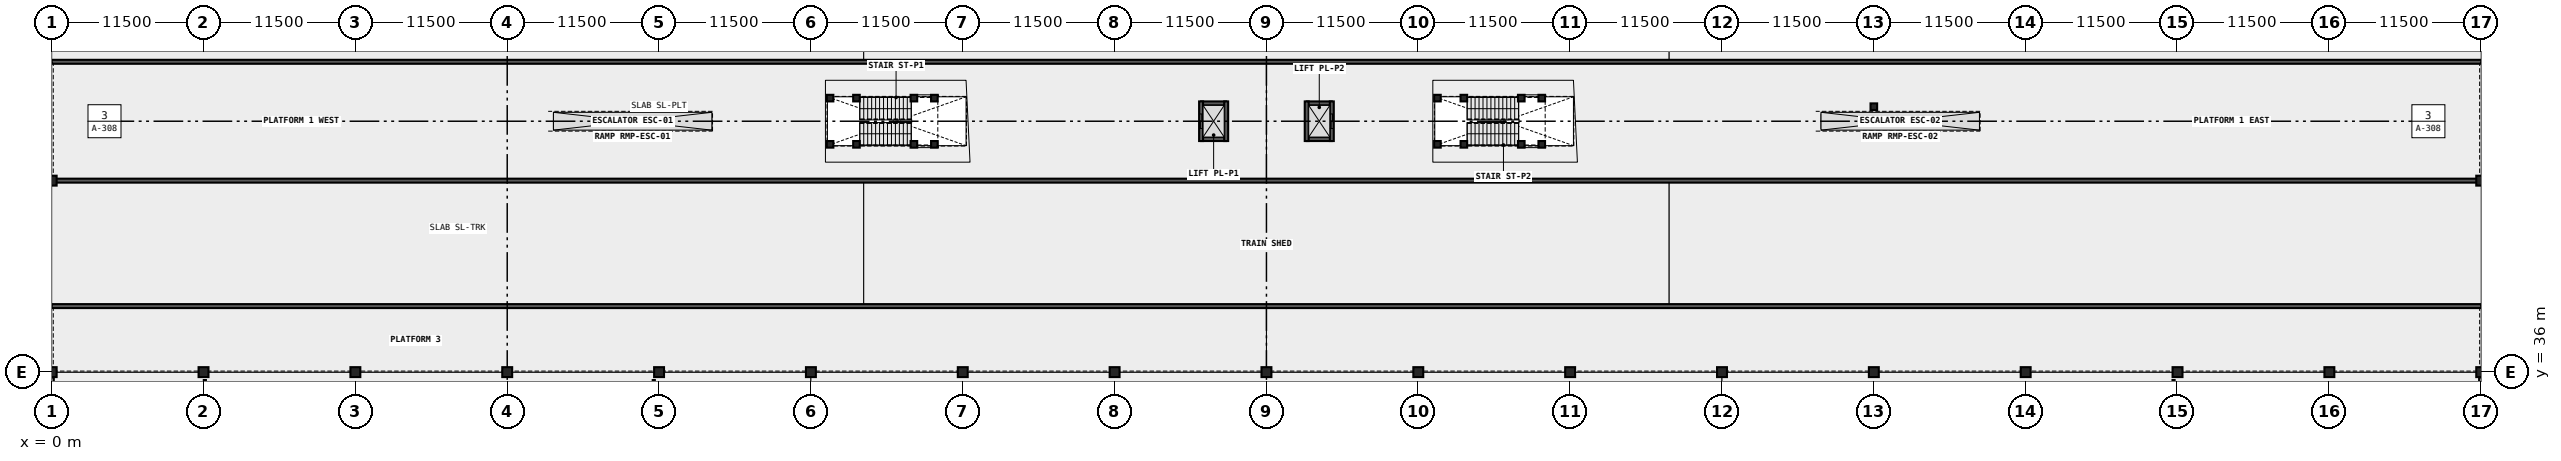
"""IFC4 building model, lengths in metres.
Left out: names, types, materials, properties, quantities, classifications, styles, units other than length and angle.
Written with IfcOpenShell. Run it as: python <this file> out.ifc"""

import sys

from ifc_helpers import new_model, si_unit, direction, frame, frame_2d, origin, origin_2d, place, context, subcontext, project, spatial, rectangle, extrude, element, fill, save


model = new_model("IFC4")
c1 = context("Model", 3, precision=1e-05, world=origin(), true_north=direction((0.0, 1.0)))
c2 = subcontext(c1, "Body", "Model", "MODEL_VIEW")
j1 = project(units=[si_unit("LENGTHUNIT", "METRE"), si_unit("PLANEANGLEUNIT", "RADIAN")], contexts=[c1])
p1 = place(None, origin())
s1 = spatial("IfcSite", under=j1, at=p1, CompositionType="ELEMENT")
p2 = place(p1, origin())
s2 = spatial("IfcBuilding", under=s1, at=p2, CompositionType="ELEMENT")
p3 = place(p2, origin())
s3 = spatial("IfcBuildingStorey", under=s2, at=p3, CompositionType="ELEMENT", Elevation=0.0)
for number, where, z_axis, x_axis in (
    (1, (0.0, 36.0, 0.0), (0.0, 0.0, 1.0), (1.0, 0.0, 0.0)),
    (2, (11.5, 36.0, 0.0), (0.0, 0.0, 1.0), (1.0, 0.0, 0.0)),
    (3, (23.0, 36.0, 0.0), (0.0, 0.0, 1.0), (1.0, 0.0, 0.0)),
    (4, (34.5, 36.0, 0.0), (0.0, 0.0, 1.0), (1.0, 0.0, 0.0)),
    (5, (46.0, 36.0, 0.0), (0.0, 0.0, 1.0), (1.0, 0.0, 0.0)),
    (6, (57.5, 36.0, 0.0), (0.0, 0.0, 1.0), (1.0, 0.0, 0.0)),
    (7, (69.0, 36.0, 0.0), (0.0, 0.0, 1.0), (1.0, 0.0, 0.0)),
    (8, (80.5, 36.0, 0.0), (0.0, 0.0, 1.0), (1.0, 0.0, 0.0)),
    (9, (92.0, 36.0, 0.0), (0.0, 0.0, 1.0), (1.0, 0.0, 0.0)),
    (10, (103.5, 36.0, 0.0), (0.0, 0.0, 1.0), (1.0, 0.0, 0.0)),
    (11, (115.0, 36.0, 0.0), (0.0, 0.0, 1.0), (1.0, 0.0, 0.0)),
    (12, (126.5, 36.0, 0.0), (0.0, 0.0, 1.0), (1.0, 0.0, 0.0)),
    (13, (138.0, 36.0, 0.0), (0.0, 0.0, 1.0), (1.0, 0.0, 0.0)),
    (14, (149.5, 36.0, 0.0), (0.0, 0.0, 1.0), (1.0, 0.0, 0.0)),
    (15, (161.0, 36.0, 0.0), (0.0, 0.0, 1.0), (1.0, 0.0, 0.0)),
    (16, (172.5, 36.0, 0.0), (0.0, 0.0, 1.0), (1.0, 0.0, 0.0)),
    (17, (184.0, 36.0, 0.0), (0.0, 0.0, 1.0), (1.0, 0.0, 0.0)),
):
    element("IfcColumn", number, at=place(p3, frame(where, z_axis=z_axis, x_axis=x_axis)), inside=s3, PredefinedType="COLUMN", context=c2, shape_type="SweptSolid", body=[
        extrude(rectangle(XDim=0.75, YDim=0.75, at=origin_2d()), origin(), (0.0, 0.0, 1.0), 4.2),
    ])
for number, where, z_axis, x_axis in (
    (18, (87.05, 53.65, 0.95), (0.0, 0.0, 1.0), (1.0, 0.0, 0.0)),
    (19, (87.05, 56.35, 0.95), (0.0, 0.0, 1.0), (1.0, 0.0, 0.0)),
):
    element("IfcWall", number, at=place(p3, frame(where, z_axis=z_axis, x_axis=x_axis)), inside=s3, PredefinedType="SHEAR", context=c2, shape_type="SweptSolid", body=[
        extrude(rectangle(XDim=1.9, YDim=0.3, at=frame_2d((0.95, 0.0))), origin(), (0.0, 0.0, 1.0), 3.25),
    ])
p4 = place(p3, frame((87.05, 53.5, 0.95), z_axis=(0.0, 0.0, 1.0), x_axis=(0.0, 1.0, 0.0)))
e20 = element("IfcWall", 20, at=p4, inside=s3, PredefinedType="SHEAR", context=c2, shape_type="SweptSolid", body=[
    extrude(rectangle(XDim=3.0, YDim=0.3, at=frame_2d((1.5, 0.0))), origin(), (0.0, 0.0, 1.0), 3.25),
])
p5 = place(p4, frame((0.95, 0.0, 0.3)))
e21 = element("IfcOpeningElement", 21, at=p5, cuts=e20, PredefinedType="OPENING", context=c2, shape_type="SweptSolid", body=[
    extrude(rectangle(XDim=1.1, YDim=2.15, at=frame_2d((0.55, 1.075))), frame((0.0, 0.16, 0.0), z_axis=(0.0, -1.0, 0.0), x_axis=(1.0, 0.0, 0.0)), (0.0, 0.0, 1.0), 0.32),
])
p6 = place(p3, frame((88.95, 53.5, 0.95), z_axis=(0.0, 0.0, 1.0), x_axis=(0.0, 1.0, 0.0)))
e22 = element("IfcWall", 22, at=p6, inside=s3, PredefinedType="SHEAR", context=c2, shape_type="SweptSolid", body=[
    extrude(rectangle(XDim=3.0, YDim=0.3, at=frame_2d((1.5, 0.0))), origin(), (0.0, 0.0, 1.0), 3.25),
])
for number, where, z_axis, x_axis in (
    (23, (95.05, 53.65, 0.95), (0.0, 0.0, 1.0), (1.0, 0.0, 0.0)),
    (24, (95.05, 56.35, 0.95), (0.0, 0.0, 1.0), (1.0, 0.0, 0.0)),
):
    element("IfcWall", number, at=place(p3, frame(where, z_axis=z_axis, x_axis=x_axis)), inside=s3, PredefinedType="SHEAR", context=c2, shape_type="SweptSolid", body=[
        extrude(rectangle(XDim=1.9, YDim=0.3, at=frame_2d((0.95, 0.0))), origin(), (0.0, 0.0, 1.0), 3.25),
    ])
p7 = place(p3, frame((95.05, 53.5, 0.95), z_axis=(0.0, 0.0, 1.0), x_axis=(0.0, 1.0, 0.0)))
e25 = element("IfcWall", 25, at=p7, inside=s3, PredefinedType="SHEAR", context=c2, shape_type="SweptSolid", body=[
    extrude(rectangle(XDim=3.0, YDim=0.3, at=frame_2d((1.5, 0.0))), origin(), (0.0, 0.0, 1.0), 3.25),
])
p8 = place(p3, frame((96.95, 53.5, 0.95), z_axis=(0.0, 0.0, 1.0), x_axis=(0.0, 1.0, 0.0)))
e26 = element("IfcWall", 26, at=p8, inside=s3, PredefinedType="SHEAR", context=c2, shape_type="SweptSolid", body=[
    extrude(rectangle(XDim=3.0, YDim=0.3, at=frame_2d((1.5, 0.0))), origin(), (0.0, 0.0, 1.0), 3.25),
])
p9 = place(p8, frame((0.95, 0.0, 0.3)))
e27 = element("IfcOpeningElement", 27, at=p9, cuts=e26, PredefinedType="OPENING", context=c2, shape_type="SweptSolid", body=[
    extrude(rectangle(XDim=1.1, YDim=2.15, at=frame_2d((0.55, 1.075))), frame((0.0, 0.16, 0.0), z_axis=(0.0, -1.0, 0.0), x_axis=(1.0, 0.0, 0.0)), (0.0, 0.0, 1.0), 0.32),
])
for number, where, z_axis, x_axis in (
    (28, (58.95, 53.25, -0.32), (0.0, 0.0, 1.0), (1.0, 0.0, 0.0)),
    (29, (58.95, 56.75, -0.32), (0.0, 0.0, 1.0), (1.0, 0.0, 0.0)),
    (30, (60.95, 53.25, -0.32), (0.0, 0.0, 1.0), (1.0, 0.0, 0.0)),
    (31, (60.95, 56.75, -0.32), (0.0, 0.0, 1.0), (1.0, 0.0, 0.0)),
):
    element("IfcColumn", number, at=place(p3, frame(where, z_axis=z_axis, x_axis=x_axis)), inside=s3, PredefinedType="COLUMN", context=c2, shape_type="SweptSolid", body=[
        extrude(rectangle(XDim=0.5, YDim=0.5, at=origin_2d()), origin(), (0.0, 0.0, 1.0), 4.22),
    ])
for number, where, z_axis, x_axis in (
    (32, (65.3, 53.25, -0.32), (0.0, 0.0, 1.0), (1.0, 0.0, 0.0)),
    (33, (65.3, 56.75, -0.32), (0.0, 0.0, 1.0), (1.0, 0.0, 0.0)),
    (34, (66.85, 53.25, -0.32), (0.0, 0.0, 1.0), (1.0, 0.0, 0.0)),
    (35, (66.85, 56.75, -0.32), (0.0, 0.0, 1.0), (1.0, 0.0, 0.0)),
):
    element("IfcColumn", number, at=place(p3, frame(where, z_axis=z_axis, x_axis=x_axis)), inside=s3, PredefinedType="COLUMN", context=c2, shape_type="SweptSolid", body=[
        extrude(rectangle(XDim=0.5, YDim=0.5, at=origin_2d()), origin(), (0.0, 0.0, 1.0), 2.24),
    ])
for number, where, z_axis, x_axis in (
    (36, (104.95, 53.25, -0.32), (0.0, 0.0, 1.0), (1.0, 0.0, 0.0)),
    (37, (104.95, 56.75, -0.32), (0.0, 0.0, 1.0), (1.0, 0.0, 0.0)),
    (38, (106.95, 53.25, -0.32), (0.0, 0.0, 1.0), (1.0, 0.0, 0.0)),
    (39, (106.95, 56.75, -0.32), (0.0, 0.0, 1.0), (1.0, 0.0, 0.0)),
):
    element("IfcColumn", number, at=place(p3, frame(where, z_axis=z_axis, x_axis=x_axis)), inside=s3, PredefinedType="COLUMN", context=c2, shape_type="SweptSolid", body=[
        extrude(rectangle(XDim=0.5, YDim=0.5, at=origin_2d()), origin(), (0.0, 0.0, 1.0), 4.22),
    ])
for number, where, z_axis, x_axis in (
    (40, (111.3, 53.25, -0.32), (0.0, 0.0, 1.0), (1.0, 0.0, 0.0)),
    (41, (111.3, 56.75, -0.32), (0.0, 0.0, 1.0), (1.0, 0.0, 0.0)),
    (42, (112.85, 53.25, -0.32), (0.0, 0.0, 1.0), (1.0, 0.0, 0.0)),
    (43, (112.85, 56.75, -0.32), (0.0, 0.0, 1.0), (1.0, 0.0, 0.0)),
):
    element("IfcColumn", number, at=place(p3, frame(where, z_axis=z_axis, x_axis=x_axis)), inside=s3, PredefinedType="COLUMN", context=c2, shape_type="SweptSolid", body=[
        extrude(rectangle(XDim=0.5, YDim=0.5, at=origin_2d()), origin(), (0.0, 0.0, 1.0), 2.24),
    ])
for number, where, z_axis, x_axis in (
    (44, (0.0, 50.5, -0.32), (0.0, 0.0, 1.0), (1.0, 0.0, 0.0)),
    (45, (0.0, 59.5, -0.32), (0.0, 0.0, 1.0), (1.0, 0.0, 0.0)),
    (46, (0.0, 41.0, -0.32), (0.0, 0.0, 1.0), (1.0, 0.0, 0.0)),
):
    element("IfcWall", number, at=place(p3, frame(where, z_axis=z_axis, x_axis=x_axis)), inside=s3, PredefinedType="SHEAR", context=c2, shape_type="SweptSolid", body=[
        extrude(rectangle(XDim=184.0, YDim=0.3, at=frame_2d((92.0, 0.0))), origin(), (0.0, 0.0, 1.0), 1.27),
    ])
p10 = place(p3, frame((0.0, 50.5, 0.55), z_axis=(0.0, 0.0, 1.0), x_axis=(1.0, 0.0, 0.0)))
e47 = element("IfcColumn", 47, at=p10, inside=s3, PredefinedType="COLUMN", context=c2, shape_type="SweptSolid", body=[
    extrude(rectangle(XDim=0.75, YDim=0.75, at=origin_2d()), origin(), (0.0, 0.0, 1.0), 3.65),
])
for number, where, z_axis, x_axis in (
    (48, (46.0, 53.9, 0.0), (0.0, 0.0, 1.0), (1.0, 0.0, 0.0)),
    (49, (46.0, 56.1, 0.0), (0.0, 0.0, 1.0), (1.0, 0.0, 0.0)),
    (50, (138.0, 53.9, 0.0), (0.0, 0.0, 1.0), (1.0, 0.0, 0.0)),
    (51, (138.0, 56.1, 0.0), (0.0, 0.0, 1.0), (1.0, 0.0, 0.0)),
):
    element("IfcColumn", number, at=place(p3, frame(where, z_axis=z_axis, x_axis=x_axis)), inside=s3, PredefinedType="COLUMN", context=c2, shape_type="SweptSolid", body=[
        extrude(rectangle(XDim=0.5, YDim=0.5, at=origin_2d()), origin(), (0.0, 0.0, 1.0), 4.2),
    ])
p11 = place(p3, frame((184.0, 50.5, 0.55), z_axis=(0.0, 0.0, 1.0), x_axis=(1.0, 0.0, 0.0)))
e52 = element("IfcColumn", 52, at=p11, inside=s3, PredefinedType="COLUMN", context=c2, shape_type="SweptSolid", body=[
    extrude(rectangle(XDim=0.75, YDim=0.75, at=origin_2d()), origin(), (0.0, 0.0, 1.0), 3.65),
])
p12 = place(p3, frame((0.0, 27.57, 0.0), z_axis=(0.0, 0.0, 1.0), x_axis=(0.0, 1.0, 0.0)))
e53 = element("IfcWall", 53, at=p12, inside=s3, PredefinedType="SOLIDWALL", context=c2, shape_type="SweptSolid", body=[
    extrude(rectangle(XDim=8.035, YDim=0.32, at=frame_2d((4.018, 0.0))), origin(), (0.0, 0.0, 1.0), 3.2),
])
p13 = place(p12, frame((1.545, 0.0, 0.85)))
e54 = element("IfcOpeningElement", 54, at=p13, cuts=e53, PredefinedType="OPENING", context=c2, shape_type="SweptSolid", body=[
    extrude(rectangle(XDim=1.7, YDim=1.5, at=frame_2d((0.85, 0.75))), frame((0.0, 0.17, 0.0), z_axis=(0.0, -1.0, 0.0), x_axis=(1.0, 0.0, 0.0)), (0.0, 0.0, 1.0), 0.34),
])
p14 = place(p12, frame((4.79, 0.0, 0.85)))
e55 = element("IfcOpeningElement", 55, at=p14, cuts=e53, PredefinedType="OPENING", context=c2, shape_type="SweptSolid", body=[
    extrude(rectangle(XDim=1.7, YDim=1.5, at=frame_2d((0.85, 0.75))), frame((0.0, 0.17, 0.0), z_axis=(0.0, -1.0, 0.0), x_axis=(1.0, 0.0, 0.0)), (0.0, 0.0, 1.0), 0.34),
])
p15 = place(p3, frame((184.0, 27.57, 0.0), z_axis=(0.0, 0.0, 1.0), x_axis=(0.0, 1.0, 0.0)))
e56 = element("IfcWall", 56, at=p15, inside=s3, PredefinedType="SOLIDWALL", context=c2, shape_type="SweptSolid", body=[
    extrude(rectangle(XDim=8.035, YDim=0.32, at=frame_2d((4.018, 0.0))), origin(), (0.0, 0.0, 1.0), 3.2),
])
p16 = place(p15, frame((1.078, 0.0, 0.84)))
e57 = element("IfcOpeningElement", 57, at=p16, cuts=e56, PredefinedType="OPENING", context=c2, shape_type="SweptSolid", body=[
    extrude(rectangle(XDim=2.4, YDim=2.1, at=frame_2d((1.2, 1.05))), frame((0.0, 0.17, 0.0), z_axis=(0.0, -1.0, 0.0), x_axis=(1.0, 0.0, 0.0)), (0.0, 0.0, 1.0), 0.34),
])
p17 = place(p15, frame((4.557, 0.0, 0.84)))
e58 = element("IfcOpeningElement", 58, at=p17, cuts=e56, PredefinedType="OPENING", context=c2, shape_type="SweptSolid", body=[
    extrude(rectangle(XDim=2.4, YDim=2.1, at=frame_2d((1.2, 1.05))), frame((0.0, 0.17, 0.0), z_axis=(0.0, -1.0, 0.0), x_axis=(1.0, 0.0, 0.0)), (0.0, 0.0, 1.0), 0.34),
])
p18 = place(p3, frame((45.6, 27.6, 0.0), z_axis=(0.0, 0.0, 1.0), x_axis=(0.0, 1.0, 0.0)))
e59 = element("IfcWall", 59, at=p18, inside=s3, PredefinedType="PARTITIONING", context=c2, shape_type="SweptSolid", body=[
    extrude(rectangle(XDim=7.8, YDim=0.16, at=frame_2d((3.9, 0.0))), origin(), (0.0, 0.0, 1.0), 3.88),
])
p19 = place(p18, frame((2.8, 0.0, 0.0)))
e60 = element("IfcOpeningElement", 60, at=p19, cuts=e59, PredefinedType="OPENING", context=c2, shape_type="SweptSolid", body=[
    extrude(rectangle(XDim=1.9, YDim=2.35, at=frame_2d((0.95, 1.175))), frame((0.0, 0.09, 0.0), z_axis=(0.0, -1.0, 0.0), x_axis=(1.0, 0.0, 0.0)), (0.0, 0.0, 1.0), 0.18),
])
p20 = place(p3, frame((11.6, 27.6, 0.0), z_axis=(0.0, 0.0, 1.0), x_axis=(0.0, 1.0, 0.0)))
e61 = element("IfcWall", 61, at=p20, inside=s3, PredefinedType="PARTITIONING", context=c2, shape_type="SweptSolid", body=[
    extrude(rectangle(XDim=7.8, YDim=0.16, at=frame_2d((3.9, 0.0))), origin(), (0.0, 0.0, 1.0), 3.0),
])
p21 = place(p20, frame((2.8, 0.0, 0.0)))
e62 = element("IfcOpeningElement", 62, at=p21, cuts=e61, PredefinedType="OPENING", context=c2, shape_type="SweptSolid", body=[
    extrude(rectangle(XDim=1.9, YDim=2.35, at=frame_2d((0.95, 1.175))), frame((0.0, 0.09, 0.0), z_axis=(0.0, -1.0, 0.0), x_axis=(1.0, 0.0, 0.0)), (0.0, 0.0, 1.0), 0.18),
])
p22 = place(p3, frame((160.7, 27.6, 0.0), z_axis=(0.0, 0.0, 1.0), x_axis=(0.0, 1.0, 0.0)))
e63 = element("IfcWall", 63, at=p22, inside=s3, PredefinedType="PARTITIONING", context=c2, shape_type="SweptSolid", body=[
    extrude(rectangle(XDim=7.8, YDim=0.16, at=frame_2d((3.9, 0.0))), origin(), (0.0, 0.0, 1.0), 3.0),
])
p23 = place(p22, frame((2.8, 0.0, 0.0)))
e64 = element("IfcOpeningElement", 64, at=p23, cuts=e63, PredefinedType="OPENING", context=c2, shape_type="SweptSolid", body=[
    extrude(rectangle(XDim=1.9, YDim=2.35, at=frame_2d((0.95, 1.175))), frame((0.0, 0.09, 0.0), z_axis=(0.0, -1.0, 0.0), x_axis=(1.0, 0.0, 0.0)), (0.0, 0.0, 1.0), 0.18),
])
p24 = place(p5, origin())
e65 = element("IfcDoor", 65, at=p24, inside=s3, OperationType="SLIDING_TO_LEFT", PredefinedType="DOOR", context=c2, shape_type="SweptSolid", body=[
    extrude(rectangle(XDim=1.1, YDim=2.15, at=frame_2d((0.55, 1.075))), frame((0.0, 0.025, 0.0), z_axis=(0.0, -1.0, 0.0), x_axis=(1.0, 0.0, 0.0)), (0.0, 0.0, 1.0), 0.05),
])
fill(e21, e65)
p25 = place(p9, origin())
e66 = element("IfcDoor", 66, at=p25, inside=s3, OperationType="SLIDING_TO_LEFT", PredefinedType="DOOR", context=c2, shape_type="SweptSolid", body=[
    extrude(rectangle(XDim=1.1, YDim=2.15, at=frame_2d((0.55, 1.075))), frame((0.0, 0.025, 0.0), z_axis=(0.0, -1.0, 0.0), x_axis=(1.0, 0.0, 0.0)), (0.0, 0.0, 1.0), 0.05),
])
fill(e27, e66)
save(model, sys.argv[1])
